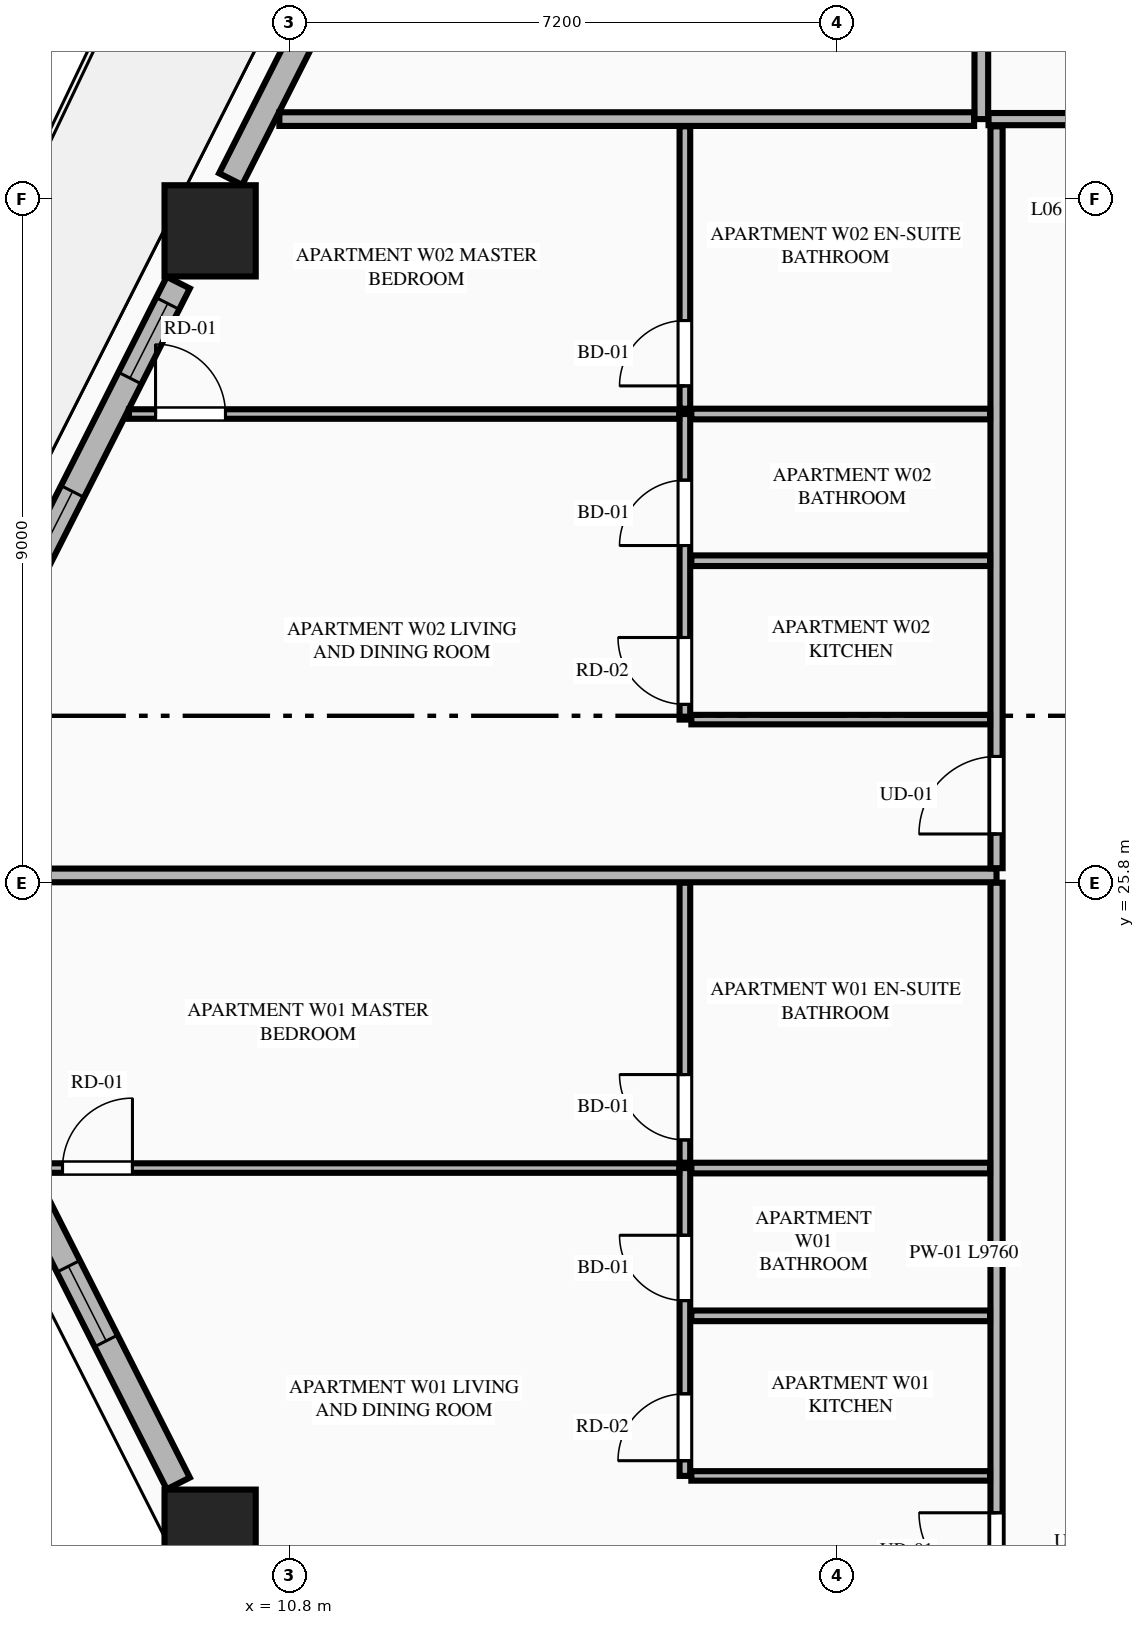
"""IFC4 building model, lengths in metres.
Left out: names, types, materials, properties, quantities, classifications, styles, units other than length and angle.
Written with IfcOpenShell. Run it as: python <this file> out.ifc"""

import sys

from ifc_helpers import new_model, si_unit, direction, frame, frame_2d, origin, origin_2d, place, context, subcontext, project, spatial, rectangle, extrude, element, fill, save


model = new_model("IFC4")
c1 = context("Model", 3, precision=1e-05, world=origin(), true_north=direction((0.0, 1.0)))
c2 = subcontext(c1, "Body", "Model", "MODEL_VIEW")
j1 = project(units=[si_unit("LENGTHUNIT", "METRE"), si_unit("PLANEANGLEUNIT", "RADIAN")], contexts=[c1])
p1 = place(None, origin())
s1 = spatial("IfcSite", under=j1, at=p1, CompositionType="ELEMENT")
p2 = place(p1, origin())
s2 = spatial("IfcBuilding", under=s1, at=p2, CompositionType="ELEMENT")
p3 = place(p2, frame((0.0, 0.0, 28.45)))
s3 = spatial("IfcBuildingStorey", under=s2, at=p3, CompositionType="ELEMENT", Elevation=28.45)
for number, where, z_axis, x_axis in (
    (1, (9.754, 34.38, 0.0), (0.0, 0.0, 1.0), (1.0, 0.0, 0.0)),
    (2, (9.754, 17.22, 0.0), (0.0, 0.0, 1.0), (1.0, 0.0, 0.0)),
):
    element("IfcColumn", number, at=place(p3, frame(where, z_axis=z_axis, x_axis=x_axis)), inside=s3, PredefinedType="COLUMN", context=c2, shape_type="SweptSolid", body=[
        extrude(rectangle(XDim=1.2, YDim=1.2, at=origin_2d()), origin(), (0.0, 0.0, 1.0), 3.55),
    ])
p4 = place(p3, frame((12.529, 40.01, 0.0), z_axis=(0.0, 0.0, 1.0), x_axis=(-0.451627137896, -0.892206774417, 0.0)))
e3 = element("IfcWall", 3, at=p4, inside=s3, PredefinedType="STANDARD", context=c2, shape_type="SweptSolid", body=[
    extrude(rectangle(XDim=5.547, YDim=0.34, at=frame_2d((2.773, 0.0))), origin(), (0.0, 0.0, 1.0), 2.787),
])
p5 = place(p4, frame((1.656, 0.0, 0.0)))
e4 = element("IfcOpeningElement", 4, at=p5, cuts=e3, PredefinedType="OPENING", context=c2, shape_type="SweptSolid", body=[
    extrude(rectangle(XDim=1.1, YDim=2.25, at=frame_2d((0.55, 1.125))), frame((0.0, 0.18, 0.0), z_axis=(0.0, -1.0, 0.0), x_axis=(1.0, 0.0, 0.0)), (0.0, 0.0, 1.0), 0.36),
])
p6 = place(p3, frame((9.335, 33.699, 0.0), z_axis=(0.0, 0.0, 1.0), x_axis=(-0.451590635984, -0.892225250422, 0.0)))
e5 = element("IfcWall", 5, at=p6, inside=s3, PredefinedType="STANDARD", context=c2, shape_type="SweptSolid", body=[
    extrude(rectangle(XDim=5.303, YDim=0.34, at=frame_2d((2.652, 0.0))), origin(), (0.0, 0.0, 1.0), 2.787),
])
p7 = place(p6, frame((0.308, 0.0, 0.75)))
e6 = element("IfcOpeningElement", 6, at=p7, cuts=e5, PredefinedType="OPENING", context=c2, shape_type="SweptSolid", body=[
    extrude(rectangle(XDim=1.1, YDim=1.887, at=frame_2d((0.55, 0.943))), frame((0.0, 0.18, 0.0), z_axis=(0.0, -1.0, 0.0), x_axis=(1.0, 0.0, 0.0)), (0.0, 0.0, 1.0), 0.36),
])
p8 = place(p6, frame((3.08, 0.0, 0.75)))
e7 = element("IfcOpeningElement", 7, at=p8, cuts=e5, PredefinedType="OPENING", context=c2, shape_type="SweptSolid", body=[
    extrude(rectangle(XDim=1.1, YDim=1.887, at=frame_2d((0.55, 0.943))), frame((0.0, 0.18, 0.0), z_axis=(0.0, -1.0, 0.0), x_axis=(1.0, 0.0, 0.0)), (0.0, 0.0, 1.0), 0.36),
])
p9 = place(p3, frame((6.94, 22.633, 0.0), z_axis=(0.0, 0.0, 1.0), x_axis=(0.451572088722, -0.892234637686, 0.0)))
e8 = element("IfcWall", 8, at=p9, inside=s3, PredefinedType="STANDARD", context=c2, shape_type="SweptSolid", body=[
    extrude(rectangle(XDim=5.304, YDim=0.34, at=frame_2d((2.652, 0.0))), origin(), (0.0, 0.0, 1.0), 2.787),
])
p10 = place(p9, frame((2.102, 0.0, 0.75)))
e9 = element("IfcOpeningElement", 9, at=p10, cuts=e8, PredefinedType="OPENING", context=c2, shape_type="SweptSolid", body=[
    extrude(rectangle(XDim=1.1, YDim=1.887, at=frame_2d((0.55, 0.943))), frame((0.0, 0.18, 0.0), z_axis=(0.0, -1.0, 0.0), x_axis=(1.0, 0.0, 0.0)), (0.0, 0.0, 1.0), 0.36),
])
p11 = place(p3, frame((19.9, 35.85, 0.0), z_axis=(0.0, 0.0, 1.0), x_axis=(0.0, 1.0, 0.0)))
e10 = element("IfcWall", 10, at=p11, inside=s3, PredefinedType="PARTITIONING", context=c2, shape_type="SweptSolid", body=[
    extrude(rectangle(XDim=13.295, YDim=0.18, at=frame_2d((6.647, 0.0))), origin(), (0.0, 0.0, 1.0), 3.33),
])
p12 = place(p3, frame((19.995, 35.85, 0.0), z_axis=(0.0, 0.0, 1.0), x_axis=(1.0, 0.0, 0.0)))
e11 = element("IfcWall", 11, at=p12, inside=s3, PredefinedType="PARTITIONING", context=c2, shape_type="SweptSolid", body=[
    extrude(rectangle(XDim=16.432, YDim=0.16, at=frame_2d((8.216, 0.0))), origin(), (0.0, 0.0, 1.0), 3.33),
])
p13 = place(p12, frame((14.577, 0.0, 0.0)))
e12 = element("IfcOpeningElement", 12, at=p13, cuts=e11, PredefinedType="OPENING", context=c2, shape_type="SweptSolid", body=[
    extrude(rectangle(XDim=1.02, YDim=2.25, at=frame_2d((0.51, 1.125))), frame((0.0, 0.09, 0.0), z_axis=(0.0, -1.0, 0.0), x_axis=(1.0, 0.0, 0.0)), (0.0, 0.0, 1.0), 0.18),
])
p14 = place(p3, frame((10.665, 35.85, 0.0), z_axis=(0.0, 0.0, 1.0), x_axis=(1.0, 0.0, 0.0)))
e13 = element("IfcWall", 13, at=p14, inside=s3, PredefinedType="PARTITIONING", context=c2, shape_type="SweptSolid", body=[
    extrude(rectangle(XDim=9.14, YDim=0.18, at=frame_2d((4.57, 0.0))), origin(), (0.0, 0.0, 1.0), 3.33),
])
p15 = place(p3, frame((20.1, 16.045, 0.0), z_axis=(0.0, 0.0, 1.0), x_axis=(0.0, 1.0, 0.0)))
e14 = element("IfcWall", 14, at=p15, inside=s3, PredefinedType="PARTITIONING", context=c2, shape_type="SweptSolid", body=[
    extrude(rectangle(XDim=9.76, YDim=0.16, at=frame_2d((4.88, 0.0))), origin(), (0.0, 0.0, 1.0), 2.7),
])
p16 = place(p15, frame((0.45, 0.0, 0.0)))
e15 = element("IfcOpeningElement", 15, at=p16, cuts=e14, PredefinedType="OPENING", context=c2, shape_type="SweptSolid", body=[
    extrude(rectangle(XDim=1.02, YDim=2.25, at=frame_2d((0.51, 1.125))), frame((0.0, 0.09, 0.0), z_axis=(0.0, -1.0, 0.0), x_axis=(1.0, 0.0, 0.0)), (0.0, 0.0, 1.0), 0.18),
])
p17 = place(p3, frame((16.085, 18.0, 0.0), z_axis=(0.0, 0.0, 1.0), x_axis=(1.0, 0.0, 0.0)))
e16 = element("IfcWall", 16, at=p17, inside=s3, PredefinedType="PARTITIONING", context=c2, shape_type="SweptSolid", body=[
    extrude(rectangle(XDim=3.93, YDim=0.125, at=frame_2d((1.965, 0.0))), origin(), (0.0, 0.0, 1.0), 2.7),
])
p18 = place(p3, frame((16.0, 18.0, 0.0), z_axis=(0.0, 0.0, 1.0), x_axis=(0.0, 1.0, 0.0)))
e17 = element("IfcWall", 17, at=p18, inside=s3, PredefinedType="PLUMBINGWALL", context=c2, shape_type="SweptSolid", body=[
    extrude(rectangle(XDim=4.05, YDim=0.14, at=frame_2d((2.025, 0.0))), origin(), (0.0, 0.0, 1.0), 3.33),
])
p19 = place(p18, frame((0.2, 0.0, 0.0)))
e18 = element("IfcOpeningElement", 18, at=p19, cuts=e17, PredefinedType="OPENING", context=c2, shape_type="SweptSolid", body=[
    extrude(rectangle(XDim=0.88, YDim=2.15, at=frame_2d((0.44, 1.075))), frame((0.0, 0.08, 0.0), z_axis=(0.0, -1.0, 0.0), x_axis=(1.0, 0.0, 0.0)), (0.0, 0.0, 1.0), 0.16),
])
p20 = place(p18, frame((2.306, 0.0, 0.0)))
e19 = element("IfcOpeningElement", 19, at=p20, cuts=e17, PredefinedType="OPENING", context=c2, shape_type="SweptSolid", body=[
    extrude(rectangle(XDim=0.86, YDim=2.1, at=frame_2d((0.43, 1.05))), frame((0.0, 0.08, 0.0), z_axis=(0.0, -1.0, 0.0), x_axis=(1.0, 0.0, 0.0)), (0.0, 0.0, 1.0), 0.16),
])
p21 = place(p3, frame((16.0, 22.12, 0.0), z_axis=(0.0, 0.0, 1.0), x_axis=(0.0, 1.0, 0.0)))
e20 = element("IfcWall", 20, at=p21, inside=s3, PredefinedType="PLUMBINGWALL", context=c2, shape_type="SweptSolid", body=[
    extrude(rectangle(XDim=3.685, YDim=0.14, at=frame_2d((1.842, 0.0))), origin(), (0.0, 0.0, 1.0), 3.33),
])
p22 = place(p21, frame((0.3, 0.0, 0.0)))
e21 = element("IfcOpeningElement", 21, at=p22, cuts=e20, PredefinedType="OPENING", context=c2, shape_type="SweptSolid", body=[
    extrude(rectangle(XDim=0.86, YDim=2.1, at=frame_2d((0.43, 1.05))), frame((0.0, 0.08, 0.0), z_axis=(0.0, -1.0, 0.0), x_axis=(1.0, 0.0, 0.0)), (0.0, 0.0, 1.0), 0.16),
])
p23 = place(p3, frame((16.085, 22.05, 0.0), z_axis=(0.0, 0.0, 1.0), x_axis=(1.0, 0.0, 0.0)))
e22 = element("IfcWall", 22, at=p23, inside=s3, PredefinedType="PLUMBINGWALL", context=c2, shape_type="SweptSolid", body=[
    extrude(rectangle(XDim=3.93, YDim=0.14, at=frame_2d((1.965, 0.0))), origin(), (0.0, 0.0, 1.0), 3.33),
])
p24 = place(p3, frame((7.462, 22.05, 0.0), z_axis=(0.0, 0.0, 1.0), x_axis=(1.0, 0.0, 0.0)))
e23 = element("IfcWall", 23, at=p24, inside=s3, PredefinedType="PARTITIONING", context=c2, shape_type="SweptSolid", body=[
    extrude(rectangle(XDim=8.463, YDim=0.125, at=frame_2d((4.231, 0.0))), origin(), (0.0, 0.0, 1.0), 3.33),
])
p25 = place(p24, frame((0.35, 0.0, 0.0)))
e24 = element("IfcOpeningElement", 24, at=p25, cuts=e23, PredefinedType="OPENING", context=c2, shape_type="SweptSolid", body=[
    extrude(rectangle(XDim=0.92, YDim=2.15, at=frame_2d((0.46, 1.075))), frame((0.0, 0.073, 0.0), z_axis=(0.0, -1.0, 0.0), x_axis=(1.0, 0.0, 0.0)), (0.0, 0.0, 1.0), 0.145),
])
p26 = place(p3, frame((16.085, 20.106, 0.0), z_axis=(0.0, 0.0, 1.0), x_axis=(1.0, 0.0, 0.0)))
e25 = element("IfcWall", 25, at=p26, inside=s3, PredefinedType="PLUMBINGWALL", context=c2, shape_type="SweptSolid", body=[
    extrude(rectangle(XDim=3.93, YDim=0.14, at=frame_2d((1.965, 0.0))), origin(), (0.0, 0.0, 1.0), 3.33),
])
p27 = place(p3, frame((6.087, 25.9, 0.0), z_axis=(0.0, 0.0, 1.0), x_axis=(1.0, 0.0, 0.0)))
e26 = element("IfcWall", 26, at=p27, inside=s3, PredefinedType="PARTITIONING", context=c2, shape_type="SweptSolid", body=[
    extrude(rectangle(XDim=14.013, YDim=0.18, at=frame_2d((7.007, 0.0))), origin(), (0.0, 0.0, 1.0), 3.33),
])
p28 = place(p3, frame((20.1, 25.995, 0.0), z_axis=(0.0, 0.0, 1.0), x_axis=(0.0, 1.0, 0.0)))
e27 = element("IfcWall", 27, at=p28, inside=s3, PredefinedType="PARTITIONING", context=c2, shape_type="SweptSolid", body=[
    extrude(rectangle(XDim=9.76, YDim=0.16, at=frame_2d((4.88, 0.0))), origin(), (0.0, 0.0, 1.0), 2.7),
])
p29 = place(p28, frame((0.45, 0.0, 0.0)))
e28 = element("IfcOpeningElement", 28, at=p29, cuts=e27, PredefinedType="OPENING", context=c2, shape_type="SweptSolid", body=[
    extrude(rectangle(XDim=1.02, YDim=2.25, at=frame_2d((0.51, 1.125))), frame((0.0, 0.09, 0.0), z_axis=(0.0, -1.0, 0.0), x_axis=(1.0, 0.0, 0.0)), (0.0, 0.0, 1.0), 0.18),
])
p30 = place(p3, frame((16.085, 27.95, 0.0), z_axis=(0.0, 0.0, 1.0), x_axis=(1.0, 0.0, 0.0)))
e29 = element("IfcWall", 29, at=p30, inside=s3, PredefinedType="PARTITIONING", context=c2, shape_type="SweptSolid", body=[
    extrude(rectangle(XDim=3.93, YDim=0.125, at=frame_2d((1.965, 0.0))), origin(), (0.0, 0.0, 1.0), 3.33),
])
p31 = place(p3, frame((16.0, 27.95, 0.0), z_axis=(0.0, 0.0, 1.0), x_axis=(0.0, 1.0, 0.0)))
e30 = element("IfcWall", 30, at=p31, inside=s3, PredefinedType="PLUMBINGWALL", context=c2, shape_type="SweptSolid", body=[
    extrude(rectangle(XDim=4.02, YDim=0.14, at=frame_2d((2.01, 0.0))), origin(), (0.0, 0.0, 1.0), 3.33),
])
p32 = place(p31, frame((0.2, 0.0, 0.0)))
e31 = element("IfcOpeningElement", 31, at=p32, cuts=e30, PredefinedType="OPENING", context=c2, shape_type="SweptSolid", body=[
    extrude(rectangle(XDim=0.88, YDim=2.15, at=frame_2d((0.44, 1.075))), frame((0.0, 0.08, 0.0), z_axis=(0.0, -1.0, 0.0), x_axis=(1.0, 0.0, 0.0)), (0.0, 0.0, 1.0), 0.16),
])
p33 = place(p31, frame((2.29, 0.0, 0.0)))
e32 = element("IfcOpeningElement", 32, at=p33, cuts=e30, PredefinedType="OPENING", context=c2, shape_type="SweptSolid", body=[
    extrude(rectangle(XDim=0.86, YDim=2.1, at=frame_2d((0.43, 1.05))), frame((0.0, 0.08, 0.0), z_axis=(0.0, -1.0, 0.0), x_axis=(1.0, 0.0, 0.0)), (0.0, 0.0, 1.0), 0.16),
])
p34 = place(p3, frame((16.0, 32.04, 0.0), z_axis=(0.0, 0.0, 1.0), x_axis=(0.0, 1.0, 0.0)))
e33 = element("IfcWall", 33, at=p34, inside=s3, PredefinedType="PLUMBINGWALL", context=c2, shape_type="SweptSolid", body=[
    extrude(rectangle(XDim=3.715, YDim=0.14, at=frame_2d((1.857, 0.0))), origin(), (0.0, 0.0, 1.0), 3.33),
])
p35 = place(p34, frame((0.3, 0.0, 0.0)))
e34 = element("IfcOpeningElement", 34, at=p35, cuts=e33, PredefinedType="OPENING", context=c2, shape_type="SweptSolid", body=[
    extrude(rectangle(XDim=0.86, YDim=2.1, at=frame_2d((0.43, 1.05))), frame((0.0, 0.08, 0.0), z_axis=(0.0, -1.0, 0.0), x_axis=(1.0, 0.0, 0.0)), (0.0, 0.0, 1.0), 0.16),
])
p36 = place(p3, frame((16.085, 31.97, 0.0), z_axis=(0.0, 0.0, 1.0), x_axis=(1.0, 0.0, 0.0)))
e35 = element("IfcWall", 35, at=p36, inside=s3, PredefinedType="PLUMBINGWALL", context=c2, shape_type="SweptSolid", body=[
    extrude(rectangle(XDim=3.93, YDim=0.14, at=frame_2d((1.965, 0.0))), origin(), (0.0, 0.0, 1.0), 3.33),
])
p37 = place(p3, frame((8.686, 31.97, 0.0), z_axis=(0.0, 0.0, 1.0), x_axis=(1.0, 0.0, 0.0)))
e36 = element("IfcWall", 36, at=p37, inside=s3, PredefinedType="PARTITIONING", context=c2, shape_type="SweptSolid", body=[
    extrude(rectangle(XDim=7.239, YDim=0.125, at=frame_2d((3.62, 0.0))), origin(), (0.0, 0.0, 1.0), 3.33),
])
p38 = place(p37, frame((0.35, 0.0, 0.0)))
e37 = element("IfcOpeningElement", 37, at=p38, cuts=e36, PredefinedType="OPENING", context=c2, shape_type="SweptSolid", body=[
    extrude(rectangle(XDim=0.92, YDim=2.15, at=frame_2d((0.46, 1.075))), frame((0.0, 0.073, 0.0), z_axis=(0.0, -1.0, 0.0), x_axis=(1.0, 0.0, 0.0)), (0.0, 0.0, 1.0), 0.145),
])
p39 = place(p3, frame((16.085, 30.04, 0.0), z_axis=(0.0, 0.0, 1.0), x_axis=(1.0, 0.0, 0.0)))
e38 = element("IfcWall", 38, at=p39, inside=s3, PredefinedType="PLUMBINGWALL", context=c2, shape_type="SweptSolid", body=[
    extrude(rectangle(XDim=3.93, YDim=0.14, at=frame_2d((1.965, 0.0))), origin(), (0.0, 0.0, 1.0), 3.33),
])
p40 = place(p7, origin())
e39 = element("IfcWindow", 39, at=p40, inside=s3, PartitioningType="SINGLE_PANEL", PredefinedType="WINDOW", context=c2, shape_type="SweptSolid", body=[
    extrude(rectangle(XDim=1.1, YDim=1.887, at=frame_2d((0.55, 0.943))), frame((0.0, 0.03, 0.0), z_axis=(0.0, -1.0, 0.0), x_axis=(1.0, 0.0, 0.0)), (0.0, 0.0, 1.0), 0.06),
])
fill(e6, e39)
p41 = place(p10, origin())
e40 = element("IfcWindow", 40, at=p41, inside=s3, PartitioningType="SINGLE_PANEL", PredefinedType="WINDOW", context=c2, shape_type="SweptSolid", body=[
    extrude(rectangle(XDim=1.1, YDim=1.887, at=frame_2d((0.55, 0.943))), frame((0.0, 0.03, 0.0), z_axis=(0.0, -1.0, 0.0), x_axis=(1.0, 0.0, 0.0)), (0.0, 0.0, 1.0), 0.06),
])
fill(e9, e40)
p42 = place(p19, origin())
e41 = element("IfcDoor", 41, at=p42, inside=s3, OperationType="SINGLE_SWING_LEFT", PredefinedType="DOOR", context=c2, shape_type="SweptSolid", body=[
    extrude(rectangle(XDim=0.88, YDim=2.15, at=frame_2d((0.44, 1.075))), frame((0.0, 0.025, 0.0), z_axis=(0.0, -1.0, 0.0), x_axis=(1.0, 0.0, 0.0)), (0.0, 0.0, 1.0), 0.05),
])
fill(e18, e41)
p43 = place(p20, origin())
e42 = element("IfcDoor", 42, at=p43, inside=s3, OperationType="SINGLE_SWING_RIGHT", PredefinedType="DOOR", context=c2, shape_type="SweptSolid", body=[
    extrude(rectangle(XDim=0.86, YDim=2.1, at=frame_2d((0.43, 1.05))), frame((0.0, 0.025, 0.0), z_axis=(0.0, -1.0, 0.0), x_axis=(1.0, 0.0, 0.0)), (0.0, 0.0, 1.0), 0.05),
])
fill(e19, e42)
p44 = place(p22, origin())
e43 = element("IfcDoor", 43, at=p44, inside=s3, OperationType="SINGLE_SWING_RIGHT", PredefinedType="DOOR", context=c2, shape_type="SweptSolid", body=[
    extrude(rectangle(XDim=0.86, YDim=2.1, at=frame_2d((0.43, 1.05))), frame((0.0, 0.025, 0.0), z_axis=(0.0, -1.0, 0.0), x_axis=(1.0, 0.0, 0.0)), (0.0, 0.0, 1.0), 0.05),
])
fill(e21, e43)
p45 = place(p16, origin())
e44 = element("IfcDoor", 44, at=p45, inside=s3, OperationType="SINGLE_SWING_RIGHT", PredefinedType="DOOR", context=c2, shape_type="SweptSolid", body=[
    extrude(rectangle(XDim=1.02, YDim=2.25, at=frame_2d((0.51, 1.125))), frame((0.0, 0.025, 0.0), z_axis=(0.0, -1.0, 0.0), x_axis=(1.0, 0.0, 0.0)), (0.0, 0.0, 1.0), 0.05),
])
fill(e15, e44)
p46 = place(p25, origin())
e45 = element("IfcDoor", 45, at=p46, inside=s3, OperationType="SINGLE_SWING_RIGHT", PredefinedType="DOOR", context=c2, shape_type="SweptSolid", body=[
    extrude(rectangle(XDim=0.92, YDim=2.15, at=frame_2d((0.46, 1.075))), frame((0.0, 0.025, 0.0), z_axis=(0.0, -1.0, 0.0), x_axis=(1.0, 0.0, 0.0)), (0.0, 0.0, 1.0), 0.05),
])
fill(e24, e45)
p47 = place(p32, origin())
e46 = element("IfcDoor", 46, at=p47, inside=s3, OperationType="SINGLE_SWING_RIGHT", PredefinedType="DOOR", context=c2, shape_type="SweptSolid", body=[
    extrude(rectangle(XDim=0.88, YDim=2.15, at=frame_2d((0.44, 1.075))), frame((0.0, 0.025, 0.0), z_axis=(0.0, -1.0, 0.0), x_axis=(1.0, 0.0, 0.0)), (0.0, 0.0, 1.0), 0.05),
])
fill(e31, e46)
p48 = place(p33, origin())
e47 = element("IfcDoor", 47, at=p48, inside=s3, OperationType="SINGLE_SWING_LEFT", PredefinedType="DOOR", context=c2, shape_type="SweptSolid", body=[
    extrude(rectangle(XDim=0.86, YDim=2.1, at=frame_2d((0.43, 1.05))), frame((0.0, 0.025, 0.0), z_axis=(0.0, -1.0, 0.0), x_axis=(1.0, 0.0, 0.0)), (0.0, 0.0, 1.0), 0.05),
])
fill(e32, e47)
p49 = place(p35, origin())
e48 = element("IfcDoor", 48, at=p49, inside=s3, OperationType="SINGLE_SWING_LEFT", PredefinedType="DOOR", context=c2, shape_type="SweptSolid", body=[
    extrude(rectangle(XDim=0.86, YDim=2.1, at=frame_2d((0.43, 1.05))), frame((0.0, 0.025, 0.0), z_axis=(0.0, -1.0, 0.0), x_axis=(1.0, 0.0, 0.0)), (0.0, 0.0, 1.0), 0.05),
])
fill(e34, e48)
p50 = place(p29, origin())
e49 = element("IfcDoor", 49, at=p50, inside=s3, OperationType="SINGLE_SWING_LEFT", PredefinedType="DOOR", context=c2, shape_type="SweptSolid", body=[
    extrude(rectangle(XDim=1.02, YDim=2.25, at=frame_2d((0.51, 1.125))), frame((0.0, 0.025, 0.0), z_axis=(0.0, -1.0, 0.0), x_axis=(1.0, 0.0, 0.0)), (0.0, 0.0, 1.0), 0.05),
])
fill(e28, e49)
p51 = place(p38, origin())
e50 = element("IfcDoor", 50, at=p51, inside=s3, OperationType="SINGLE_SWING_LEFT", PredefinedType="DOOR", context=c2, shape_type="SweptSolid", body=[
    extrude(rectangle(XDim=0.92, YDim=2.15, at=frame_2d((0.46, 1.075))), frame((0.0, 0.025, 0.0), z_axis=(0.0, -1.0, 0.0), x_axis=(1.0, 0.0, 0.0)), (0.0, 0.0, 1.0), 0.05),
])
fill(e37, e50)
p52 = place(p8, origin())
e51 = element("IfcWindow", 51, at=p52, inside=s3, PartitioningType="SINGLE_PANEL", PredefinedType="WINDOW", context=c2, shape_type="SweptSolid", body=[
    extrude(rectangle(XDim=1.1, YDim=1.887, at=frame_2d((0.55, 0.943))), frame((0.0, 0.03, 0.0), z_axis=(0.0, -1.0, 0.0), x_axis=(1.0, 0.0, 0.0)), (0.0, 0.0, 1.0), 0.06),
])
fill(e7, e51)
save(model, sys.argv[1])
